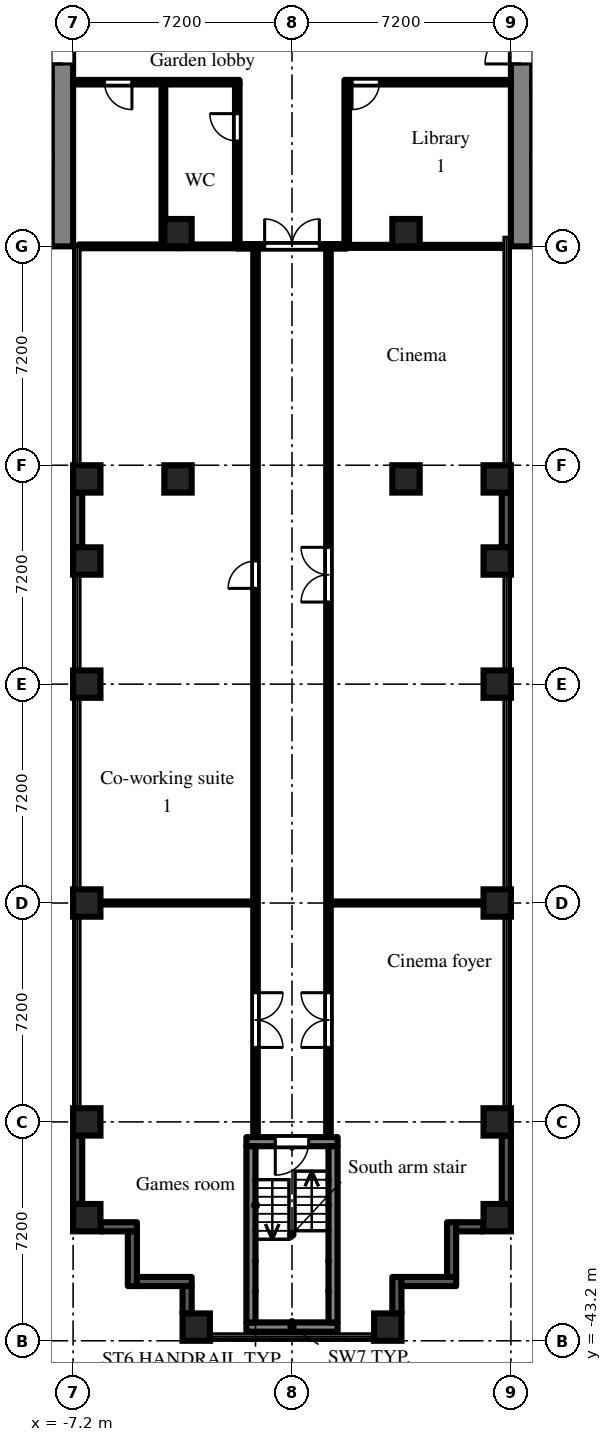
"""IFC4 building model, lengths in metres.
Left out: names, types, materials, properties, quantities, classifications, styles, units other than length and angle.
Written with IfcOpenShell. Run it as: python <this file> out.ifc"""

import sys

from ifc_helpers import new_model, si_unit, direction, frame, frame_2d, origin, origin_2d, place, context, subcontext, project, spatial, rectangle, extrude, element, fill, save


model = new_model("IFC4")
c1 = context("Model", 3, precision=1e-05, world=origin(), true_north=direction((0.0, 1.0)))
c2 = subcontext(c1, "Body", "Model", "MODEL_VIEW")
j1 = project(units=[si_unit("LENGTHUNIT", "METRE"), si_unit("PLANEANGLEUNIT", "RADIAN")], contexts=[c1])
p1 = place(None, origin())
s1 = spatial("IfcSite", under=j1, at=p1, CompositionType="ELEMENT")
p2 = place(p1, origin())
s2 = spatial("IfcBuilding", under=s1, at=p2, CompositionType="ELEMENT")
p3 = place(p2, frame((0.0, 0.0, 7.2)))
s3 = spatial("IfcBuildingStorey", under=s2, at=p3, CompositionType="ELEMENT", Elevation=7.2)
for number, where, z_axis, x_axis in (
    (1, (-6.75, -39.15, 0.0), (0.0, 0.0, 1.0), (1.0, 0.0, 0.0)),
    (2, (-6.75, -36.0, 0.0), (0.0, 0.0, 1.0), (1.0, 0.0, 0.0)),
    (3, (-6.75, -28.8, 0.0), (0.0, 0.0, 1.0), (1.0, 0.0, 0.0)),
    (4, (-6.75, -21.6, 0.0), (0.0, 0.0, 1.0), (1.0, 0.0, 0.0)),
    (5, (-6.75, -17.55, 0.0), (0.0, 0.0, 1.0), (1.0, 0.0, 0.0)),
    (6, (-6.75, -14.85, 0.0), (0.0, 0.0, 1.0), (1.0, 0.0, 0.0)),
    (7, (-3.75, -14.85, 0.0), (0.0, 0.0, 1.0), (1.0, 0.0, 0.0)),
    (8, (-3.75, -6.75, 0.0), (0.0, 0.0, 1.0), (1.0, 0.0, 0.0)),
    (9, (-3.15, -42.75, 0.0), (0.0, 0.0, 1.0), (1.0, 0.0, 0.0)),
    (10, (3.15, -42.75, 0.0), (0.0, 0.0, 1.0), (1.0, 0.0, 0.0)),
    (11, (3.75, -14.85, 0.0), (0.0, 0.0, 1.0), (1.0, 0.0, 0.0)),
    (12, (3.75, -6.75, 0.0), (0.0, 0.0, 1.0), (1.0, 0.0, 0.0)),
    (13, (6.75, -39.15, 0.0), (0.0, 0.0, 1.0), (1.0, 0.0, 0.0)),
    (14, (6.75, -36.0, 0.0), (0.0, 0.0, 1.0), (1.0, 0.0, 0.0)),
    (15, (6.75, -28.8, 0.0), (0.0, 0.0, 1.0), (1.0, 0.0, 0.0)),
    (16, (6.75, -21.6, 0.0), (0.0, 0.0, 1.0), (1.0, 0.0, 0.0)),
    (17, (6.75, -17.55, 0.0), (0.0, 0.0, 1.0), (1.0, 0.0, 0.0)),
    (18, (6.75, -14.85, 0.0), (0.0, 0.0, 1.0), (1.0, 0.0, 0.0)),
):
    element("IfcColumn", number, at=place(p3, frame(where, z_axis=z_axis, x_axis=x_axis)), inside=s3, PredefinedType="COLUMN", context=c2, shape_type="SweptSolid", body=[
        extrude(rectangle(XDim=0.9, YDim=0.9, at=origin_2d()), origin(), (0.0, 0.0, 1.0), 4.5),
    ])
p4 = place(p3, frame((-7.05, -15.3, 0.0), z_axis=(0.0, 0.0, 1.0), x_axis=(0.0, -1.0, 0.0)))
e19 = element("IfcWall", 19, at=p4, inside=s3, PredefinedType="SOLIDWALL", context=c2, shape_type="SweptSolid", body=[
    extrude(rectangle(XDim=1.8, YDim=0.3, at=frame_2d((0.9, 0.0))), origin(), (0.0, 0.0, 1.0), 3.6),
])
p5 = place(p3, frame((-7.05, -36.45, 0.0), z_axis=(0.0, 0.0, 1.0), x_axis=(0.0, -1.0, 0.0)))
e20 = element("IfcWall", 20, at=p5, inside=s3, PredefinedType="SOLIDWALL", context=c2, shape_type="SweptSolid", body=[
    extrude(rectangle(XDim=2.25, YDim=0.3, at=frame_2d((1.125, 0.0))), origin(), (0.0, 0.0, 1.0), 3.6),
])
p6 = place(p3, frame((-6.3, -39.45, 0.0), z_axis=(0.0, 0.0, 1.0), x_axis=(1.0, 0.0, 0.0)))
e21 = element("IfcWall", 21, at=p6, inside=s3, PredefinedType="SOLIDWALL", context=c2, shape_type="SweptSolid", body=[
    extrude(rectangle(XDim=1.2, YDim=0.3, at=frame_2d((0.6, 0.0))), origin(), (0.0, 0.0, 1.0), 4.075),
])
p7 = place(p3, frame((-5.25, -39.6, 0.0), z_axis=(0.0, 0.0, 1.0), x_axis=(0.0, -1.0, 0.0)))
e22 = element("IfcWall", 22, at=p7, inside=s3, PredefinedType="SOLIDWALL", context=c2, shape_type="SweptSolid", body=[
    extrude(rectangle(XDim=1.8, YDim=0.3, at=frame_2d((0.9, 0.0))), origin(), (0.0, 0.0, 1.0), 4.075),
])
p8 = place(p3, frame((-5.1, -41.25, 0.0), z_axis=(0.0, 0.0, 1.0), x_axis=(1.0, 0.0, 0.0)))
e23 = element("IfcWall", 23, at=p8, inside=s3, PredefinedType="SOLIDWALL", context=c2, shape_type="SweptSolid", body=[
    extrude(rectangle(XDim=1.8, YDim=0.3, at=frame_2d((0.9, 0.0))), origin(), (0.0, 0.0, 1.0), 4.075),
])
p9 = place(p3, frame((-3.45, -41.4, 0.0), z_axis=(0.0, 0.0, 1.0), x_axis=(0.0, -1.0, 0.0)))
e24 = element("IfcWall", 24, at=p9, inside=s3, PredefinedType="SOLIDWALL", context=c2, shape_type="SweptSolid", body=[
    extrude(rectangle(XDim=0.9, YDim=0.3, at=frame_2d((0.45, 0.0))), origin(), (0.0, 0.0, 1.0), 4.075),
])
p10 = place(p3, frame((3.45, -42.3, 0.0), z_axis=(0.0, 0.0, 1.0), x_axis=(0.0, 1.0, 0.0)))
e25 = element("IfcWall", 25, at=p10, inside=s3, PredefinedType="SOLIDWALL", context=c2, shape_type="SweptSolid", body=[
    extrude(rectangle(XDim=1.2, YDim=0.3, at=frame_2d((0.6, 0.0))), origin(), (0.0, 0.0, 1.0), 4.075),
])
p11 = place(p3, frame((3.6, -41.25, 0.0), z_axis=(0.0, 0.0, 1.0), x_axis=(1.0, 0.0, 0.0)))
e26 = element("IfcWall", 26, at=p11, inside=s3, PredefinedType="SOLIDWALL", context=c2, shape_type="SweptSolid", body=[
    extrude(rectangle(XDim=1.8, YDim=0.3, at=frame_2d((0.9, 0.0))), origin(), (0.0, 0.0, 1.0), 4.075),
])
p12 = place(p3, frame((5.25, -41.1, 0.0), z_axis=(0.0, 0.0, 1.0), x_axis=(0.0, 1.0, 0.0)))
e27 = element("IfcWall", 27, at=p12, inside=s3, PredefinedType="SOLIDWALL", context=c2, shape_type="SweptSolid", body=[
    extrude(rectangle(XDim=1.8, YDim=0.3, at=frame_2d((0.9, 0.0))), origin(), (0.0, 0.0, 1.0), 4.075),
])
p13 = place(p3, frame((5.4, -39.45, 0.0), z_axis=(0.0, 0.0, 1.0), x_axis=(1.0, 0.0, 0.0)))
e28 = element("IfcWall", 28, at=p13, inside=s3, PredefinedType="SOLIDWALL", context=c2, shape_type="SweptSolid", body=[
    extrude(rectangle(XDim=0.9, YDim=0.3, at=frame_2d((0.45, 0.0))), origin(), (0.0, 0.0, 1.0), 4.075),
])
p14 = place(p3, frame((7.05, -38.7, 0.0), z_axis=(0.0, 0.0, 1.0), x_axis=(0.0, 1.0, 0.0)))
e29 = element("IfcWall", 29, at=p14, inside=s3, PredefinedType="SOLIDWALL", context=c2, shape_type="SweptSolid", body=[
    extrude(rectangle(XDim=2.25, YDim=0.3, at=frame_2d((1.125, 0.0))), origin(), (0.0, 0.0, 1.0), 3.6),
])
p15 = place(p3, frame((7.05, -17.1, 0.0), z_axis=(0.0, 0.0, 1.0), x_axis=(0.0, 1.0, 0.0)))
e30 = element("IfcWall", 30, at=p15, inside=s3, PredefinedType="SOLIDWALL", context=c2, shape_type="SweptSolid", body=[
    extrude(rectangle(XDim=1.8, YDim=0.3, at=frame_2d((0.9, 0.0))), origin(), (0.0, 0.0, 1.0), 3.6),
])
p16 = place(p3, frame((7.55, -7.2, 0.0), z_axis=(0.0, 0.0, 1.0), x_axis=(0.0, 1.0, 0.0)))
e31 = element("IfcWall", 31, at=p16, inside=s3, PredefinedType="SHEAR", context=c2, shape_type="SweptSolid", body=[
    extrude(rectangle(XDim=14.4, YDim=0.7, at=frame_2d((7.2, 0.0))), origin(), (0.0, 0.0, 1.0), 4.075),
])
p17 = place(p16, frame((6.0, 0.0, 0.0)))
e32 = element("IfcOpeningElement", 32, at=p17, cuts=e31, PredefinedType="OPENING", context=c2, shape_type="SweptSolid", body=[
    extrude(rectangle(XDim=2.4, YDim=2.2, at=frame_2d((1.2, 1.1))), frame((0.0, 0.36, 0.0), z_axis=(0.0, -1.0, 0.0), x_axis=(1.0, 0.0, 0.0)), (0.0, 0.0, 1.0), 0.72),
])
p18 = place(p3, frame((-7.55, -7.2, 0.0), z_axis=(0.0, 0.0, 1.0), x_axis=(0.0, 1.0, 0.0)))
e33 = element("IfcWall", 33, at=p18, inside=s3, PredefinedType="SHEAR", context=c2, shape_type="SweptSolid", body=[
    extrude(rectangle(XDim=14.4, YDim=0.7, at=frame_2d((7.2, 0.0))), origin(), (0.0, 0.0, 1.0), 4.075),
])
p19 = place(p18, frame((6.0, 0.0, 0.0)))
e34 = element("IfcOpeningElement", 34, at=p19, cuts=e33, PredefinedType="OPENING", context=c2, shape_type="SweptSolid", body=[
    extrude(rectangle(XDim=2.4, YDim=2.2, at=frame_2d((1.2, 1.1))), frame((0.0, 0.36, 0.0), z_axis=(0.0, -1.0, 0.0), x_axis=(1.0, 0.0, 0.0)), (0.0, 0.0, 1.0), 0.72),
])
p20 = place(p3, frame((-1.5, -36.65, 0.0), z_axis=(0.0, 0.0, 1.0), x_axis=(1.0, 0.0, 0.0)))
e35 = element("IfcWall", 35, at=p20, inside=s3, PredefinedType="SHEAR", context=c2, shape_type="SweptSolid", body=[
    extrude(rectangle(XDim=3.0, YDim=0.3, at=frame_2d((1.5, 0.0))), origin(), (0.0, 0.0, 1.0), 4.075),
])
p21 = place(p20, frame((0.95, 0.0, 0.0)))
e36 = element("IfcOpeningElement", 36, at=p21, cuts=e35, PredefinedType="OPENING", context=c2, shape_type="SweptSolid", body=[
    extrude(rectangle(XDim=1.1, YDim=2.1, at=frame_2d((0.55, 1.05))), frame((0.0, 0.16, 0.0), z_axis=(0.0, -1.0, 0.0), x_axis=(1.0, 0.0, 0.0)), (0.0, 0.0, 1.0), 0.32),
])
p22 = place(p3, frame((-1.5, -42.75, 0.0), z_axis=(0.0, 0.0, 1.0), x_axis=(1.0, 0.0, 0.0)))
e37 = element("IfcWall", 37, at=p22, inside=s3, PredefinedType="SHEAR", context=c2, shape_type="SweptSolid", body=[
    extrude(rectangle(XDim=3.0, YDim=0.3, at=frame_2d((1.5, 0.0))), origin(), (0.0, 0.0, 1.0), 4.075),
])
for number, where, z_axis, x_axis in (
    (38, (-1.35, -36.8, 0.0), (0.0, 0.0, 1.0), (0.0, -1.0, 0.0)),
    (39, (1.35, -36.8, 0.0), (0.0, 0.0, 1.0), (0.0, -1.0, 0.0)),
):
    element("IfcWall", number, at=place(p3, frame(where, z_axis=z_axis, x_axis=x_axis)), inside=s3, PredefinedType="SHEAR", context=c2, shape_type="SweptSolid", body=[
        extrude(rectangle(XDim=5.8, YDim=0.3, at=frame_2d((2.9, 0.0))), origin(), (0.0, 0.0, 1.0), 4.075),
    ])
p23 = place(p3, frame((-7.2, -1.8, 0.0), z_axis=(0.0, 0.0, 1.0), x_axis=(1.0, 0.0, 0.0)))
e40 = element("IfcWall", 40, at=p23, inside=s3, PredefinedType="PARTITIONING", context=c2, shape_type="SweptSolid", body=[
    extrude(rectangle(XDim=5.475, YDim=0.15, at=frame_2d((2.737, 0.0))), origin(), (0.0, 0.0, 1.0), 4.075),
])
p24 = place(p23, frame((1.035, 0.0, 0.0)))
e41 = element("IfcOpeningElement", 41, at=p24, cuts=e40, PredefinedType="OPENING", context=c2, shape_type="SweptSolid", body=[
    extrude(rectangle(XDim=0.9, YDim=2.1, at=frame_2d((0.45, 1.05))), frame((0.0, 0.085, 0.0), z_axis=(0.0, -1.0, 0.0), x_axis=(1.0, 0.0, 0.0)), (0.0, 0.0, 1.0), 0.17),
])
p25 = place(p3, frame((-6.9, -28.8, 0.0), z_axis=(0.0, 0.0, 1.0), x_axis=(1.0, 0.0, 0.0)))
e42 = element("IfcWall", 42, at=p25, inside=s3, PredefinedType="PARTITIONING", context=c2, shape_type="SweptSolid", body=[
    extrude(rectangle(XDim=5.625, YDim=0.1, at=frame_2d((2.812, 0.0))), origin(), (0.0, 0.0, 1.0), 4.075),
])
p26 = place(p3, frame((-7.02, -7.2, 0.0), z_axis=(0.0, 0.0, 1.0), x_axis=(1.0, 0.0, 0.0)))
e43 = element("IfcWall", 43, at=p26, inside=s3, PredefinedType="PARTITIONING", context=c2, shape_type="SweptSolid", body=[
    extrude(rectangle(XDim=3.27, YDim=0.125, at=frame_2d((1.635, 0.0))), origin(), (0.0, 0.0, 1.0), 3.6),
])
p27 = place(p3, frame((-4.23, -7.137, 0.0), z_axis=(0.0, 0.0, 1.0), x_axis=(0.0, 1.0, 0.0)))
e44 = element("IfcWall", 44, at=p27, inside=s3, PredefinedType="PARTITIONING", context=c2, shape_type="SweptSolid", body=[
    extrude(rectangle(XDim=5.262, YDim=0.125, at=frame_2d((2.631, 0.0))), origin(), (0.0, 0.0, 1.0), 4.075),
])
p28 = place(p3, frame((-1.8, -7.125, 0.0), z_axis=(0.0, 0.0, 1.0), x_axis=(0.0, 1.0, 0.0)))
e45 = element("IfcWall", 45, at=p28, inside=s3, PredefinedType="PARTITIONING", context=c2, shape_type="SweptSolid", body=[
    extrude(rectangle(XDim=5.25, YDim=0.15, at=frame_2d((2.625, 0.0))), origin(), (0.0, 0.0, 1.0), 4.075),
])
p29 = place(p28, frame((3.39, 0.0, 0.0)))
e46 = element("IfcOpeningElement", 46, at=p29, cuts=e45, PredefinedType="OPENING", context=c2, shape_type="SweptSolid", body=[
    extrude(rectangle(XDim=0.9, YDim=2.1, at=frame_2d((0.45, 1.05))), frame((0.0, 0.085, 0.0), z_axis=(0.0, -1.0, 0.0), x_axis=(1.0, 0.0, 0.0)), (0.0, 0.0, 1.0), 0.17),
])
p30 = place(p3, frame((-1.8, -7.2, 0.0), z_axis=(0.0, 0.0, 1.0), x_axis=(1.0, 0.0, 0.0)))
e47 = element("IfcWall", 47, at=p30, inside=s3, PredefinedType="PARTITIONING", context=c2, shape_type="SweptSolid", body=[
    extrude(rectangle(XDim=3.6, YDim=0.15, at=frame_2d((1.8, 0.0))), origin(), (0.0, 0.0, 1.0), 4.075),
])
p31 = place(p30, frame((0.9, 0.0, 0.0)))
e48 = element("IfcOpeningElement", 48, at=p31, cuts=e47, PredefinedType="OPENING", context=c2, shape_type="SweptSolid", body=[
    extrude(rectangle(XDim=1.8, YDim=2.1, at=frame_2d((0.9, 1.05))), frame((0.0, 0.085, 0.0), z_axis=(0.0, -1.0, 0.0), x_axis=(1.0, 0.0, 0.0)), (0.0, 0.0, 1.0), 0.17),
])
p32 = place(p3, frame((-1.2, -36.5, 0.0), z_axis=(0.0, 0.0, 1.0), x_axis=(0.0, 1.0, 0.0)))
e49 = element("IfcWall", 49, at=p32, inside=s3, PredefinedType="PARTITIONING", context=c2, shape_type="SweptSolid", body=[
    extrude(rectangle(XDim=29.225, YDim=0.15, at=frame_2d((14.613, 0.0))), origin(), (0.0, 0.0, 1.0), 4.075),
])
p33 = place(p32, frame((18.05, 0.0, 0.0)))
e50 = element("IfcOpeningElement", 50, at=p33, cuts=e49, PredefinedType="OPENING", context=c2, shape_type="SweptSolid", body=[
    extrude(rectangle(XDim=0.9, YDim=2.1, at=frame_2d((0.45, 1.05))), frame((0.0, 0.085, 0.0), z_axis=(0.0, -1.0, 0.0), x_axis=(1.0, 0.0, 0.0)), (0.0, 0.0, 1.0), 0.17),
])
p34 = place(p32, frame((2.95, 0.0, 0.0)))
e51 = element("IfcOpeningElement", 51, at=p34, cuts=e49, PredefinedType="OPENING", context=c2, shape_type="SweptSolid", body=[
    extrude(rectangle(XDim=1.8, YDim=2.1, at=frame_2d((0.9, 1.05))), frame((0.0, 0.085, 0.0), z_axis=(0.0, -1.0, 0.0), x_axis=(1.0, 0.0, 0.0)), (0.0, 0.0, 1.0), 0.17),
])
p35 = place(p3, frame((1.2, -36.5, 0.0), z_axis=(0.0, 0.0, 1.0), x_axis=(0.0, 1.0, 0.0)))
e52 = element("IfcWall", 52, at=p35, inside=s3, PredefinedType="PARTITIONING", context=c2, shape_type="SweptSolid", body=[
    extrude(rectangle(XDim=29.225, YDim=0.15, at=frame_2d((14.613, 0.0))), origin(), (0.0, 0.0, 1.0), 4.075),
])
p36 = place(p35, frame((17.6, 0.0, 0.0)))
e53 = element("IfcOpeningElement", 53, at=p36, cuts=e52, PredefinedType="OPENING", context=c2, shape_type="SweptSolid", body=[
    extrude(rectangle(XDim=1.8, YDim=2.1, at=frame_2d((0.9, 1.05))), frame((0.0, 0.085, 0.0), z_axis=(0.0, -1.0, 0.0), x_axis=(1.0, 0.0, 0.0)), (0.0, 0.0, 1.0), 0.17),
])
p37 = place(p35, frame((2.95, 0.0, 0.0)))
e54 = element("IfcOpeningElement", 54, at=p37, cuts=e52, PredefinedType="OPENING", context=c2, shape_type="SweptSolid", body=[
    extrude(rectangle(XDim=1.8, YDim=2.1, at=frame_2d((0.9, 1.05))), frame((0.0, 0.085, 0.0), z_axis=(0.0, -1.0, 0.0), x_axis=(1.0, 0.0, 0.0)), (0.0, 0.0, 1.0), 0.17),
])
p38 = place(p3, frame((1.275, -28.8, 0.0), z_axis=(0.0, 0.0, 1.0), x_axis=(1.0, 0.0, 0.0)))
e55 = element("IfcWall", 55, at=p38, inside=s3, PredefinedType="PARTITIONING", context=c2, shape_type="SweptSolid", body=[
    extrude(rectangle(XDim=5.625, YDim=0.1, at=frame_2d((2.812, 0.0))), origin(), (0.0, 0.0, 1.0), 4.075),
])
p39 = place(p3, frame((1.8, -7.125, 0.0), z_axis=(0.0, 0.0, 1.0), x_axis=(0.0, 1.0, 0.0)))
e56 = element("IfcWall", 56, at=p39, inside=s3, PredefinedType="PARTITIONING", context=c2, shape_type="SweptSolid", body=[
    extrude(rectangle(XDim=5.4, YDim=0.15, at=frame_2d((2.7, 0.0))), origin(), (0.0, 0.0, 1.0), 4.075),
])
p40 = place(p3, frame((1.8, -7.2, 0.0), z_axis=(0.0, 0.0, 1.0), x_axis=(1.0, 0.0, 0.0)))
e57 = element("IfcWall", 57, at=p40, inside=s3, PredefinedType="PARTITIONING", context=c2, shape_type="SweptSolid", body=[
    extrude(rectangle(XDim=1.95, YDim=0.1, at=frame_2d((0.975, 0.0))), origin(), (0.0, 0.0, 1.0), 4.075),
])
p41 = place(p3, frame((1.875, -1.8, 0.0), z_axis=(0.0, 0.0, 1.0), x_axis=(1.0, 0.0, 0.0)))
e58 = element("IfcWall", 58, at=p41, inside=s3, PredefinedType="PARTITIONING", context=c2, shape_type="SweptSolid", body=[
    extrude(rectangle(XDim=5.325, YDim=0.15, at=frame_2d((2.663, 0.0))), origin(), (0.0, 0.0, 1.0), 4.075),
])
p42 = place(p41, frame((0.1, 0.0, 0.0)))
e59 = element("IfcOpeningElement", 59, at=p42, cuts=e58, PredefinedType="OPENING", context=c2, shape_type="SweptSolid", body=[
    extrude(rectangle(XDim=0.9, YDim=2.1, at=frame_2d((0.45, 1.05))), frame((0.0, 0.085, 0.0), z_axis=(0.0, -1.0, 0.0), x_axis=(1.0, 0.0, 0.0)), (0.0, 0.0, 1.0), 0.17),
])
p43 = place(p3, frame((-3.75, -7.2, 0.0), z_axis=(0.0, 0.0, 1.0), x_axis=(1.0, 0.0, 0.0)))
e60 = element("IfcWall", 60, at=p43, inside=s3, PredefinedType="PARTITIONING", context=c2, shape_type="SweptSolid", body=[
    extrude(rectangle(XDim=1.95, YDim=0.125, at=frame_2d((0.975, 0.0))), origin(), (0.0, 0.0, 1.0), 4.075),
])
p44 = place(p3, frame((3.75, -7.2, 0.0), z_axis=(0.0, 0.0, 1.0), x_axis=(1.0, 0.0, 0.0)))
e61 = element("IfcWall", 61, at=p44, inside=s3, PredefinedType="PARTITIONING", context=c2, shape_type="SweptSolid", body=[
    extrude(rectangle(XDim=3.27, YDim=0.1, at=frame_2d((1.635, 0.0))), origin(), (0.0, 0.0, 1.0), 3.6),
])
p45 = place(p17, origin())
e62 = element("IfcDoor", 62, at=p45, inside=s3, OperationType="DOUBLE_DOOR_DOUBLE_SWING", PredefinedType="DOOR", context=c2, shape_type="SweptSolid", body=[
    extrude(rectangle(XDim=2.4, YDim=2.2, at=frame_2d((1.2, 1.1))), frame((0.0, 0.025, 0.0), z_axis=(0.0, -1.0, 0.0), x_axis=(1.0, 0.0, 0.0)), (0.0, 0.0, 1.0), 0.05),
])
fill(e32, e62)
p46 = place(p19, origin())
e63 = element("IfcDoor", 63, at=p46, inside=s3, OperationType="DOUBLE_DOOR_DOUBLE_SWING", PredefinedType="DOOR", context=c2, shape_type="SweptSolid", body=[
    extrude(rectangle(XDim=2.4, YDim=2.2, at=frame_2d((1.2, 1.1))), frame((0.0, 0.025, 0.0), z_axis=(0.0, -1.0, 0.0), x_axis=(1.0, 0.0, 0.0)), (0.0, 0.0, 1.0), 0.05),
])
fill(e34, e63)
p47 = place(p21, frame((1.1, 0.0, 0.0), z_axis=(0.0, 0.0, 1.0), x_axis=(-1.0, 0.0, 0.0)))
e64 = element("IfcDoor", 64, at=p47, inside=s3, OperationType="SINGLE_SWING_RIGHT", PredefinedType="DOOR", context=c2, shape_type="SweptSolid", body=[
    extrude(rectangle(XDim=1.1, YDim=2.1, at=frame_2d((0.55, 1.05))), frame((0.0, 0.025, 0.0), z_axis=(0.0, -1.0, 0.0), x_axis=(1.0, 0.0, 0.0)), (0.0, 0.0, 1.0), 0.05),
])
fill(e36, e64)
p48 = place(p29, origin())
e65 = element("IfcDoor", 65, at=p48, inside=s3, OperationType="SINGLE_SWING_RIGHT", PredefinedType="DOOR", context=c2, shape_type="SweptSolid", body=[
    extrude(rectangle(XDim=0.9, YDim=2.1, at=frame_2d((0.45, 1.05))), frame((0.0, 0.025, 0.0), z_axis=(0.0, -1.0, 0.0), x_axis=(1.0, 0.0, 0.0)), (0.0, 0.0, 1.0), 0.05),
])
fill(e46, e65)
p49 = place(p24, frame((0.9, 0.0, 0.0), z_axis=(0.0, 0.0, 1.0), x_axis=(-1.0, 0.0, 0.0)))
e66 = element("IfcDoor", 66, at=p49, inside=s3, OperationType="SINGLE_SWING_LEFT", PredefinedType="DOOR", context=c2, shape_type="SweptSolid", body=[
    extrude(rectangle(XDim=0.9, YDim=2.1, at=frame_2d((0.45, 1.05))), frame((0.0, 0.025, 0.0), z_axis=(0.0, -1.0, 0.0), x_axis=(1.0, 0.0, 0.0)), (0.0, 0.0, 1.0), 0.05),
])
fill(e41, e66)
p50 = place(p42, frame((0.9, 0.0, 0.0), z_axis=(0.0, 0.0, 1.0), x_axis=(-1.0, 0.0, 0.0)))
e67 = element("IfcDoor", 67, at=p50, inside=s3, OperationType="SINGLE_SWING_RIGHT", PredefinedType="DOOR", context=c2, shape_type="SweptSolid", body=[
    extrude(rectangle(XDim=0.9, YDim=2.1, at=frame_2d((0.45, 1.05))), frame((0.0, 0.025, 0.0), z_axis=(0.0, -1.0, 0.0), x_axis=(1.0, 0.0, 0.0)), (0.0, 0.0, 1.0), 0.05),
])
fill(e59, e67)
p51 = place(p31, origin())
e68 = element("IfcDoor", 68, at=p51, inside=s3, OperationType="DOUBLE_DOOR_DOUBLE_SWING", PredefinedType="DOOR", context=c2, shape_type="SweptSolid", body=[
    extrude(rectangle(XDim=1.8, YDim=2.1, at=frame_2d((0.9, 1.05))), frame((0.0, 0.025, 0.0), z_axis=(0.0, -1.0, 0.0), x_axis=(1.0, 0.0, 0.0)), (0.0, 0.0, 1.0), 0.05),
])
fill(e48, e68)
p52 = place(p36, origin())
e69 = element("IfcDoor", 69, at=p52, inside=s3, OperationType="DOUBLE_DOOR_DOUBLE_SWING", PredefinedType="DOOR", context=c2, shape_type="SweptSolid", body=[
    extrude(rectangle(XDim=1.8, YDim=2.1, at=frame_2d((0.9, 1.05))), frame((0.0, 0.025, 0.0), z_axis=(0.0, -1.0, 0.0), x_axis=(1.0, 0.0, 0.0)), (0.0, 0.0, 1.0), 0.05),
])
fill(e53, e69)
p53 = place(p37, origin())
e70 = element("IfcDoor", 70, at=p53, inside=s3, OperationType="DOUBLE_DOOR_DOUBLE_SWING", PredefinedType="DOOR", context=c2, shape_type="SweptSolid", body=[
    extrude(rectangle(XDim=1.8, YDim=2.1, at=frame_2d((0.9, 1.05))), frame((0.0, 0.025, 0.0), z_axis=(0.0, -1.0, 0.0), x_axis=(1.0, 0.0, 0.0)), (0.0, 0.0, 1.0), 0.05),
])
fill(e54, e70)
p54 = place(p33, origin())
e71 = element("IfcDoor", 71, at=p54, inside=s3, OperationType="SINGLE_SWING_LEFT", PredefinedType="DOOR", context=c2, shape_type="SweptSolid", body=[
    extrude(rectangle(XDim=0.9, YDim=2.1, at=frame_2d((0.45, 1.05))), frame((0.0, 0.025, 0.0), z_axis=(0.0, -1.0, 0.0), x_axis=(1.0, 0.0, 0.0)), (0.0, 0.0, 1.0), 0.05),
])
fill(e50, e71)
p55 = place(p34, frame((1.8, 0.0, 0.0), z_axis=(0.0, 0.0, 1.0), x_axis=(-1.0, 0.0, 0.0)))
e72 = element("IfcDoor", 72, at=p55, inside=s3, OperationType="DOUBLE_DOOR_DOUBLE_SWING", PredefinedType="DOOR", context=c2, shape_type="SweptSolid", body=[
    extrude(rectangle(XDim=1.8, YDim=2.1, at=frame_2d((0.9, 1.05))), frame((0.0, 0.025, 0.0), z_axis=(0.0, -1.0, 0.0), x_axis=(1.0, 0.0, 0.0)), (0.0, 0.0, 1.0), 0.05),
])
fill(e51, e72)
save(model, sys.argv[1])
